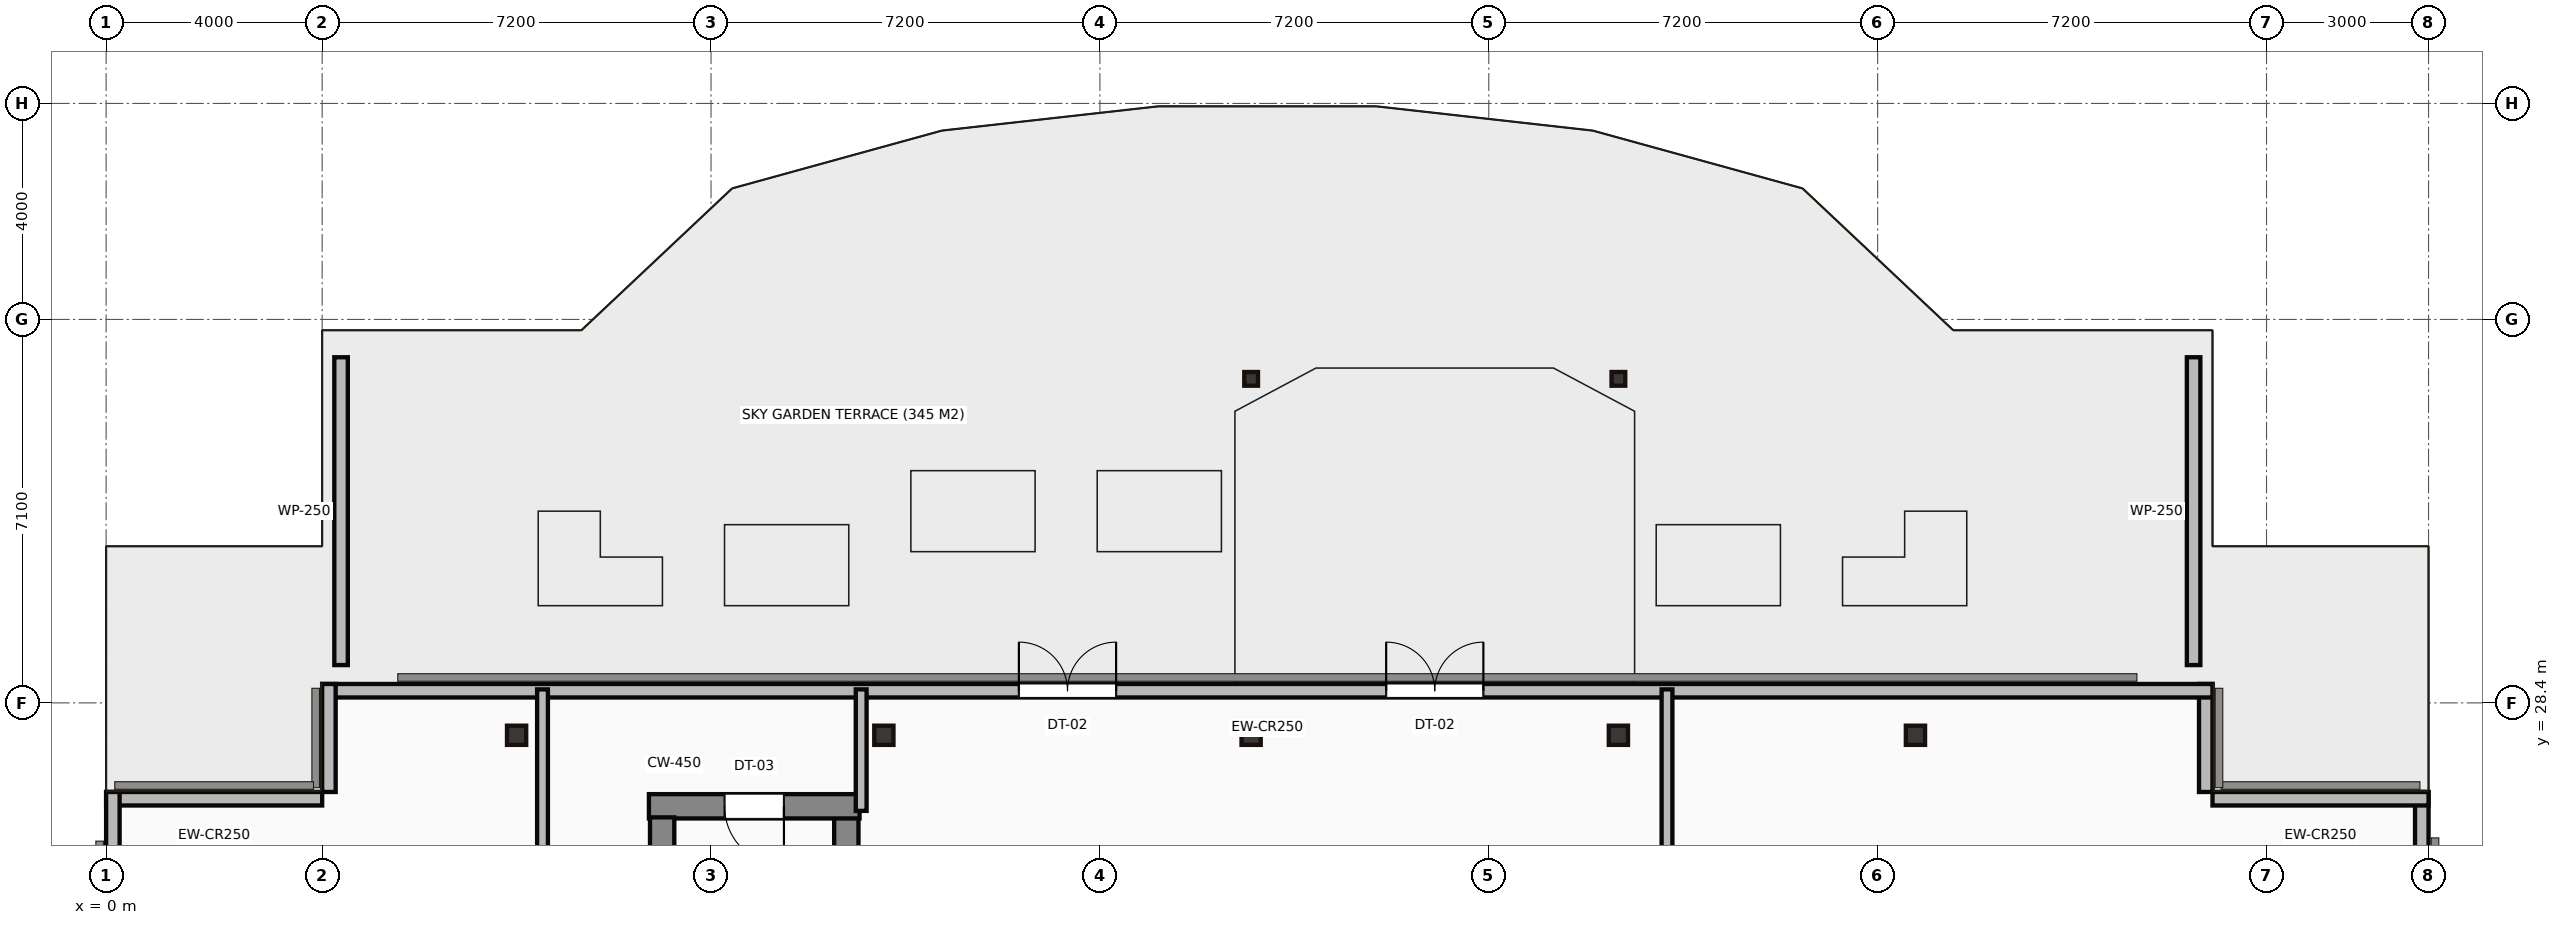
"""IFC4 building model, lengths in metres.
Left out: names, types, materials, properties, quantities, classifications, styles, units other than length and angle.
Written with IfcOpenShell. Run it as: python <this file> out.ifc"""

import sys

from ifc_helpers import new_model, si_unit, direction, frame, frame_2d, origin, origin_2d, place, context, subcontext, project, spatial, rectangle, hollow_rectangle, extrude, source, transform, mapped, element, fill, save


model = new_model("IFC4")
c1 = context("Model", 3, precision=1e-05, world=origin(), true_north=direction((0.0, 1.0)))
c2 = subcontext(c1, "Body", "Model", "MODEL_VIEW")
j1 = project(units=[si_unit("LENGTHUNIT", "METRE"), si_unit("PLANEANGLEUNIT", "RADIAN")], contexts=[c1])
p1 = place(None, origin())
s1 = spatial("IfcSite", under=j1, at=p1, CompositionType="ELEMENT")
p2 = place(p1, origin())
s2 = spatial("IfcBuilding", under=s1, at=p2, CompositionType="ELEMENT")
p3 = place(p2, frame((0.0, 0.0, 292.25)))
s3 = spatial("IfcBuildingStorey", under=s2, at=p3, CompositionType="ELEMENT", Elevation=292.25)
m1 = source(origin(), c2, "Body", "SweptSolid", [
    extrude(hollow_rectangle(XDim=0.356, YDim=0.356, WallThickness=0.019, at=origin_2d()), origin(), (0.0, 0.0, 1.0), 3.8),
])
for number, where, z_axis, x_axis in (
    (1, (7.6, 27.8, 0.0), (0.0, 0.0, 1.0), (1.0, 0.0, 0.0)),
    (2, (14.4, 27.8, 0.0), (0.0, 0.0, 1.0), (1.0, 0.0, 0.0)),
    (3, (21.2, 27.8, 0.0), (0.0, 0.0, 1.0), (1.0, 0.0, 0.0)),
    (4, (28.0, 27.8, 0.0), (0.0, 0.0, 1.0), (1.0, 0.0, 0.0)),
    (5, (33.5, 27.8, 0.0), (0.0, 0.0, 1.0), (1.0, 0.0, 0.0)),
):
    element("IfcColumn", number, at=place(p3, frame(where, z_axis=z_axis, x_axis=x_axis)), inside=s3, PredefinedType="COLUMN", context=c2, shape_type="MappedRepresentation", body=[
        mapped(m1, transform((0.0, 0.0, 0.0))),
    ])
m2 = source(origin(), c2, "Body", "SweptSolid", [
    extrude(hollow_rectangle(XDim=0.254, YDim=0.254, WallThickness=0.016, at=origin_2d()), origin(), (0.0, 0.0, 1.0), 3.5),
])
for number, where, z_axis, x_axis in (
    (6, (21.2, 34.4, 0.0), (0.0, 0.0, 1.0), (1.0, 0.0, 0.0)),
    (7, (28.0, 34.4, 0.0), (0.0, 0.0, 1.0), (1.0, 0.0, 0.0)),
):
    element("IfcColumn", number, at=place(p3, frame(where, z_axis=z_axis, x_axis=x_axis)), inside=s3, PredefinedType="COLUMN", context=c2, shape_type="MappedRepresentation", body=[
        mapped(m2, transform((0.0, 0.0, 0.0))),
    ])
m3 = source(origin(), c2, "Body", "SweptSolid", [
    extrude(rectangle(XDim=21.25, YDim=0.25, at=frame_2d((10.625, 0.0))), origin(), (0.0, 0.0, 1.0), 3.5),
])
p4 = place(p3, frame((42.875, 5.5, 0.0), z_axis=(0.0, 0.0, 1.0), x_axis=(0.0, 1.0, 0.0)))
e8 = element("IfcWall", 8, at=p4, inside=s3, PredefinedType="STANDARD", context=c2, shape_type="MappedRepresentation", body=[
    mapped(m3, transform((0.0, 0.0, 0.0))),
])
m4 = source(origin(), c2, "Body", "SweptSolid", [
    extrude(rectangle(XDim=4.0, YDim=0.25, at=frame_2d((2.0, 0.0))), origin(), (0.0, 0.0, 1.0), 3.5),
])
p5 = place(p3, frame((43.0, 26.625, 0.0), z_axis=(0.0, 0.0, 1.0), x_axis=(-1.0, 0.0, 0.0)))
e9 = element("IfcWall", 9, at=p5, inside=s3, PredefinedType="STANDARD", context=c2, shape_type="MappedRepresentation", body=[
    mapped(m4, transform((0.0, 0.0, 0.0))),
])
m5 = source(origin(), c2, "Body", "SweptSolid", [
    extrude(rectangle(XDim=2.0, YDim=0.25, at=frame_2d((1.0, 0.0))), origin(), (0.0, 0.0, 1.0), 3.5),
])
p6 = place(p3, frame((38.875, 26.75, 0.0), z_axis=(0.0, 0.0, 1.0), x_axis=(0.0, 1.0, 0.0)))
e10 = element("IfcWall", 10, at=p6, inside=s3, PredefinedType="STANDARD", context=c2, shape_type="MappedRepresentation", body=[
    mapped(m5, transform((0.0, 0.0, 0.0))),
])
m6 = source(origin(), c2, "Body", "SweptSolid", [
    extrude(rectangle(XDim=35.0, YDim=0.25, at=frame_2d((17.5, 0.0))), origin(), (0.0, 0.0, 1.0), 3.5),
])
p7 = place(p3, frame((39.0, 28.625, 0.0), z_axis=(0.0, 0.0, 1.0), x_axis=(-1.0, 0.0, 0.0)))
e11 = element("IfcWall", 11, at=p7, inside=s3, PredefinedType="STANDARD", context=c2, shape_type="MappedRepresentation", body=[
    mapped(m6, transform((0.0, 0.0, 0.0))),
])
p8 = place(p7, frame((13.5, 0.0, 0.0)))
e12 = element("IfcOpeningElement", 12, at=p8, cuts=e11, PredefinedType="OPENING", context=c2, shape_type="SweptSolid", body=[
    extrude(rectangle(XDim=1.8, YDim=2.2, at=frame_2d((0.9, 1.1))), frame((0.0, 0.135, 0.0), z_axis=(0.0, -1.0, 0.0), x_axis=(1.0, 0.0, 0.0)), (0.0, 0.0, 1.0), 0.27),
])
p9 = place(p7, frame((20.3, 0.0, 0.0)))
e13 = element("IfcOpeningElement", 13, at=p9, cuts=e11, PredefinedType="OPENING", context=c2, shape_type="SweptSolid", body=[
    extrude(rectangle(XDim=1.8, YDim=2.2, at=frame_2d((0.9, 1.1))), frame((0.0, 0.135, 0.0), z_axis=(0.0, -1.0, 0.0), x_axis=(1.0, 0.0, 0.0)), (0.0, 0.0, 1.0), 0.27),
])
p10 = place(p3, frame((4.125, 28.75, 0.0), z_axis=(0.0, 0.0, 1.0), x_axis=(0.0, -1.0, 0.0)))
e14 = element("IfcWall", 14, at=p10, inside=s3, PredefinedType="STANDARD", context=c2, shape_type="MappedRepresentation", body=[
    mapped(m5, transform((0.0, 0.0, 0.0))),
])
p11 = place(p3, frame((4.0, 26.625, 0.0), z_axis=(0.0, 0.0, 1.0), x_axis=(-1.0, 0.0, 0.0)))
e15 = element("IfcWall", 15, at=p11, inside=s3, PredefinedType="STANDARD", context=c2, shape_type="MappedRepresentation", body=[
    mapped(m4, transform((0.0, 0.0, 0.0))),
])
m7 = source(origin(), c2, "Body", "SweptSolid", [
    extrude(rectangle(XDim=22.75, YDim=0.25, at=frame_2d((11.375, 0.0))), origin(), (0.0, 0.0, 1.0), 3.5),
])
p12 = place(p3, frame((0.125, 26.75, 0.0), z_axis=(0.0, 0.0, 1.0), x_axis=(0.0, -1.0, 0.0)))
e16 = element("IfcWall", 16, at=p12, inside=s3, PredefinedType="STANDARD", context=c2, shape_type="MappedRepresentation", body=[
    mapped(m7, transform((0.0, 0.0, 0.0))),
])
m8 = source(origin(), c2, "Body", "SweptSolid", [
    extrude(rectangle(XDim=5.7, YDim=0.25, at=frame_2d((2.85, 0.0))), origin(), (0.0, 0.0, 1.0), 1.15),
])
for number, where, z_axis, x_axis in (
    (17, (4.35, 29.1, 0.0), (0.0, 0.0, 1.0), (0.0, 1.0, 0.0)),
    (18, (38.65, 29.1, 0.0), (0.0, 0.0, 1.0), (0.0, 1.0, 0.0)),
):
    element("IfcWall", number, at=place(p3, frame(where, z_axis=z_axis, x_axis=x_axis)), inside=s3, PredefinedType="PARAPET", context=c2, shape_type="MappedRepresentation", body=[
        mapped(m8, transform((0.0, 0.0, 0.0))),
    ])
m9 = source(origin(), c2, "Body", "SweptSolid", [
    extrude(rectangle(XDim=9.08, YDim=0.45, at=frame_2d((4.54, 0.0))), origin(), (0.0, 0.0, 1.0), 3.8),
])
for number, where, z_axis, x_axis in (
    (19, (10.295, 17.2, 0.0), (0.0, 0.0, 1.0), (0.0, 1.0, 0.0)),
    (20, (13.705, 17.2, 0.0), (0.0, 0.0, 1.0), (0.0, 1.0, 0.0)),
):
    element("IfcWall", number, at=place(p3, frame(where, z_axis=z_axis, x_axis=x_axis)), inside=s3, PredefinedType="SHEAR", context=c2, shape_type="MappedRepresentation", body=[
        mapped(m9, transform((0.0, 0.0, 0.0))),
    ])
m10 = source(origin(), c2, "Body", "SweptSolid", [
    extrude(rectangle(XDim=3.9, YDim=0.45, at=frame_2d((1.95, 0.0))), origin(), (0.0, 0.0, 1.0), 3.8),
])
p13 = place(p3, frame((10.05, 26.485, 0.0), z_axis=(0.0, 0.0, 1.0), x_axis=(1.0, 0.0, 0.0)))
e21 = element("IfcWall", 21, at=p13, inside=s3, PredefinedType="SHEAR", context=c2, shape_type="MappedRepresentation", body=[
    mapped(m10, transform((0.0, 0.0, 0.0))),
])
p14 = place(p13, frame((1.4, 0.0, 0.0)))
e22 = element("IfcOpeningElement", 22, at=p14, cuts=e21, PredefinedType="OPENING", context=c2, shape_type="SweptSolid", body=[
    extrude(rectangle(XDim=1.1, YDim=2.15, at=frame_2d((0.55, 1.075))), frame((0.0, 0.235, 0.0), z_axis=(0.0, -1.0, 0.0), x_axis=(1.0, 0.0, 0.0)), (0.0, 0.0, 1.0), 0.47),
])
m11 = source(origin(), c2, "Body", "SweptSolid", [
    extrude(rectangle(XDim=11.85, YDim=0.2, at=frame_2d((5.925, 0.0))), origin(), (0.0, 0.0, 1.0), 3.5),
])
p15 = place(p3, frame((8.08, 16.8, 0.0), z_axis=(0.0, 0.0, 1.0), x_axis=(0.0, 1.0, 0.0)))
e23 = element("IfcWall", 23, at=p15, inside=s3, PredefinedType="PARTITIONING", context=c2, shape_type="MappedRepresentation", body=[
    mapped(m11, transform((0.0, 0.0, 0.0))),
])
p16 = place(p15, frame((2.4, 0.0, 0.0)))
e24 = element("IfcOpeningElement", 24, at=p16, cuts=e23, PredefinedType="OPENING", context=c2, shape_type="SweptSolid", body=[
    extrude(rectangle(XDim=1.1, YDim=2.15, at=frame_2d((0.55, 1.075))), frame((0.0, 0.11, 0.0), z_axis=(0.0, -1.0, 0.0), x_axis=(1.0, 0.0, 0.0)), (0.0, 0.0, 1.0), 0.22),
])
m12 = source(origin(), c2, "Body", "SweptSolid", [
    extrude(rectangle(XDim=2.25, YDim=0.2, at=frame_2d((1.125, 0.0))), origin(), (0.0, 0.0, 1.0), 3.5),
])
p17 = place(p3, frame((13.98, 26.4, 0.0), z_axis=(0.0, 0.0, 1.0), x_axis=(0.0, 1.0, 0.0)))
e25 = element("IfcWall", 25, at=p17, inside=s3, PredefinedType="PARTITIONING", context=c2, shape_type="MappedRepresentation", body=[
    mapped(m12, transform((0.0, 0.0, 0.0))),
])
p18 = place(p3, frame((28.9, 16.8, 0.0), z_axis=(0.0, 0.0, 1.0), x_axis=(0.0, 1.0, 0.0)))
e26 = element("IfcWall", 26, at=p18, inside=s3, PredefinedType="PARTITIONING", context=c2, shape_type="MappedRepresentation", body=[
    mapped(m11, transform((0.0, 0.0, 0.0))),
])
m13 = source(origin(), c2, "Body", "SweptSolid", [
    extrude(rectangle(XDim=1.8, YDim=2.2, at=frame_2d((0.9, 1.1))), frame((0.0, 0.025, 0.0), z_axis=(0.0, -1.0, 0.0), x_axis=(1.0, 0.0, 0.0)), (0.0, 0.0, 1.0), 0.05),
])
p19 = place(p8, frame((1.8, 0.0, 0.0), z_axis=(0.0, 0.0, 1.0), x_axis=(-1.0, 0.0, 0.0)))
e27 = element("IfcDoor", 27, at=p19, inside=s3, OperationType="DOUBLE_DOOR_SINGLE_SWING", PredefinedType="DOOR", context=c2, shape_type="MappedRepresentation", body=[
    mapped(m13, transform((0.0, 0.0, 0.0))),
])
fill(e12, e27)
p20 = place(p9, frame((1.8, 0.0, 0.0), z_axis=(0.0, 0.0, 1.0), x_axis=(-1.0, 0.0, 0.0)))
e28 = element("IfcDoor", 28, at=p20, inside=s3, OperationType="DOUBLE_DOOR_SINGLE_SWING", PredefinedType="DOOR", context=c2, shape_type="MappedRepresentation", body=[
    mapped(m13, transform((0.0, 0.0, 0.0))),
])
fill(e13, e28)
m14 = source(origin(), c2, "Body", "SweptSolid", [
    extrude(rectangle(XDim=1.1, YDim=2.15, at=frame_2d((0.55, 1.075))), frame((0.0, 0.025, 0.0), z_axis=(0.0, -1.0, 0.0), x_axis=(1.0, 0.0, 0.0)), (0.0, 0.0, 1.0), 0.05),
])
p21 = place(p14, frame((1.1, 0.0, 0.0), z_axis=(0.0, 0.0, 1.0), x_axis=(-1.0, 0.0, 0.0)))
e29 = element("IfcDoor", 29, at=p21, inside=s3, OperationType="SINGLE_SWING_RIGHT", PredefinedType="DOOR", context=c2, shape_type="MappedRepresentation", body=[
    mapped(m14, transform((0.0, 0.0, 0.0))),
])
fill(e22, e29)
save(model, sys.argv[1])
